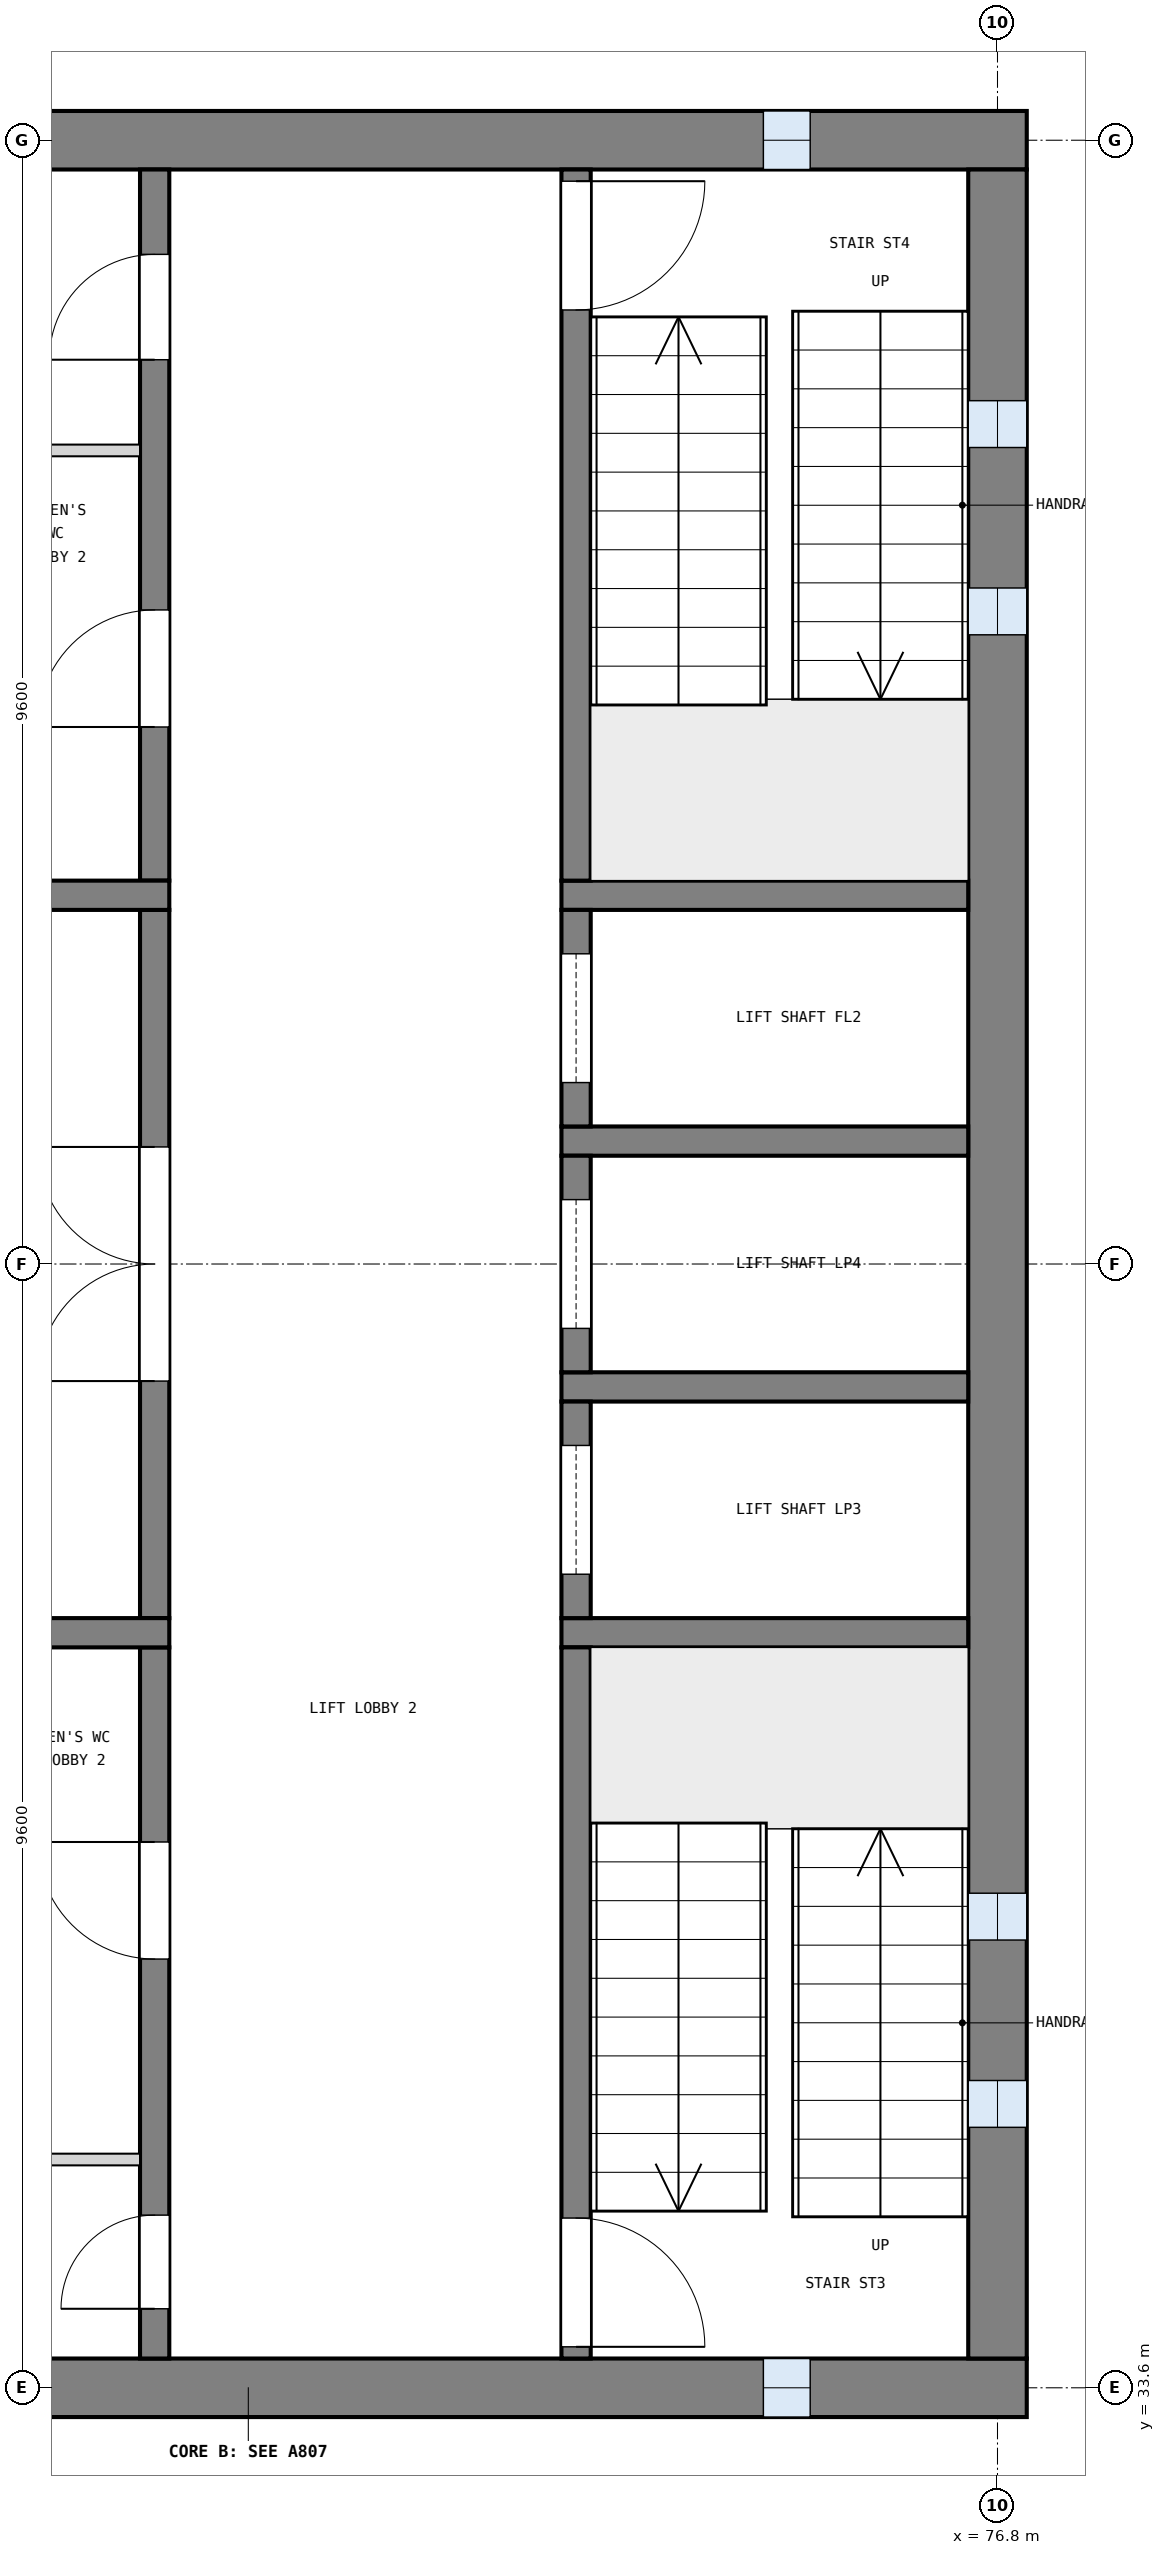
"""IFC4 building model, lengths in metres.
Left out: names, types, materials, properties, quantities, classifications, styles, units other than length and angle.
Written with IfcOpenShell. Run it as: python <this file> out.ifc"""

import sys

from ifc_helpers import new_model, si_unit, direction, frame, frame_2d, origin, place, context, subcontext, project, spatial, rectangle, extrude, element, fill, save


model = new_model("IFC4")
c1 = context("Model", 3, precision=1e-05, world=origin(), true_north=direction((0.0, 1.0)))
c2 = subcontext(c1, "Body", "Model", "MODEL_VIEW")
j1 = project(units=[si_unit("LENGTHUNIT", "METRE"), si_unit("PLANEANGLEUNIT", "RADIAN")], contexts=[c1])
p1 = place(None, origin())
s1 = spatial("IfcSite", under=j1, at=p1, CompositionType="ELEMENT")
p2 = place(p1, origin())
s2 = spatial("IfcBuilding", under=s1, at=p2, CompositionType="ELEMENT")
p3 = place(p2, frame((0.0, 0.0, 21.0)))
s3 = spatial("IfcBuildingStorey", under=s2, at=p3, CompositionType="ELEMENT", Elevation=21.0)
p4 = place(p3, frame((63.75, 52.8, 0.0), z_axis=(0.0, 0.0, 1.0), x_axis=(1.0, 0.0, 0.0)))
e1 = element("IfcWall", 1, at=p4, inside=s3, PredefinedType="SHEAR", context=c2, shape_type="SweptSolid", body=[
    extrude(rectangle(XDim=13.3, YDim=0.5, at=frame_2d((6.65, 0.0))), origin(), (0.0, 0.0, 1.0), 3.9),
])
p5 = place(p4, frame((11.05, 0.0, 1.0)))
e2 = element("IfcOpeningElement", 2, at=p5, cuts=e1, PredefinedType="OPENING", context=c2, shape_type="SweptSolid", body=[
    extrude(rectangle(XDim=0.4, YDim=2.0, at=frame_2d((0.2, 1.0))), frame((0.0, 0.26, 0.0), z_axis=(0.0, -1.0, 0.0), x_axis=(1.0, 0.0, 0.0)), (0.0, 0.0, 1.0), 0.52),
])
p6 = place(p3, frame((63.75, 33.6, 0.0), z_axis=(0.0, 0.0, 1.0), x_axis=(1.0, 0.0, 0.0)))
e3 = element("IfcWall", 3, at=p6, inside=s3, PredefinedType="SHEAR", context=c2, shape_type="SweptSolid", body=[
    extrude(rectangle(XDim=13.3, YDim=0.5, at=frame_2d((6.65, 0.0))), origin(), (0.0, 0.0, 1.0), 3.9),
])
p7 = place(p6, frame((11.05, 0.0, 1.0)))
e4 = element("IfcOpeningElement", 4, at=p7, cuts=e3, PredefinedType="OPENING", context=c2, shape_type="SweptSolid", body=[
    extrude(rectangle(XDim=0.4, YDim=2.0, at=frame_2d((0.2, 1.0))), frame((0.0, 0.26, 0.0), z_axis=(0.0, -1.0, 0.0), x_axis=(1.0, 0.0, 0.0)), (0.0, 0.0, 1.0), 0.52),
])
p8 = place(p3, frame((76.8, 33.85, 0.0), z_axis=(0.0, 0.0, 1.0), x_axis=(0.0, 1.0, 0.0)))
e5 = element("IfcWall", 5, at=p8, inside=s3, PredefinedType="SHEAR", context=c2, shape_type="SweptSolid", body=[
    extrude(rectangle(XDim=18.7, YDim=0.5, at=frame_2d((9.35, 0.0))), origin(), (0.0, 0.0, 1.0), 3.9),
])
p9 = place(p8, frame((1.975, 0.0, 1.0)))
e6 = element("IfcOpeningElement", 6, at=p9, cuts=e5, PredefinedType="OPENING", context=c2, shape_type="SweptSolid", body=[
    extrude(rectangle(XDim=0.4, YDim=2.0, at=frame_2d((0.2, 1.0))), frame((0.0, 0.26, 0.0), z_axis=(0.0, -1.0, 0.0), x_axis=(1.0, 0.0, 0.0)), (0.0, 0.0, 1.0), 0.52),
])
p10 = place(p8, frame((3.575, 0.0, 1.0)))
e7 = element("IfcOpeningElement", 7, at=p10, cuts=e5, PredefinedType="OPENING", context=c2, shape_type="SweptSolid", body=[
    extrude(rectangle(XDim=0.4, YDim=2.0, at=frame_2d((0.2, 1.0))), frame((0.0, 0.26, 0.0), z_axis=(0.0, -1.0, 0.0), x_axis=(1.0, 0.0, 0.0)), (0.0, 0.0, 1.0), 0.52),
])
p11 = place(p8, frame((14.725, 0.0, 1.0)))
e8 = element("IfcOpeningElement", 8, at=p11, cuts=e5, PredefinedType="OPENING", context=c2, shape_type="SweptSolid", body=[
    extrude(rectangle(XDim=0.4, YDim=2.0, at=frame_2d((0.2, 1.0))), frame((0.0, 0.26, 0.0), z_axis=(0.0, -1.0, 0.0), x_axis=(1.0, 0.0, 0.0)), (0.0, 0.0, 1.0), 0.52),
])
p12 = place(p8, frame((16.325, 0.0, 1.0)))
e9 = element("IfcOpeningElement", 9, at=p12, cuts=e5, PredefinedType="OPENING", context=c2, shape_type="SweptSolid", body=[
    extrude(rectangle(XDim=0.4, YDim=2.0, at=frame_2d((0.2, 1.0))), frame((0.0, 0.26, 0.0), z_axis=(0.0, -1.0, 0.0), x_axis=(1.0, 0.0, 0.0)), (0.0, 0.0, 1.0), 0.52),
])
for number, where, z_axis, x_axis in (
    (10, (76.55, 40.05, 0.0), (0.0, 0.0, 1.0), (-1.0, 0.0, 0.0)),
    (11, (76.55, 42.15, 0.0), (0.0, 0.0, 1.0), (-1.0, 0.0, 0.0)),
    (12, (76.55, 44.25, 0.0), (0.0, 0.0, 1.0), (-1.0, 0.0, 0.0)),
    (13, (76.55, 46.35, 0.0), (0.0, 0.0, 1.0), (-1.0, 0.0, 0.0)),
):
    element("IfcWall", number, at=place(p3, frame(where, z_axis=z_axis, x_axis=x_axis)), inside=s3, PredefinedType="SOLIDWALL", context=c2, shape_type="SweptSolid", body=[
        extrude(rectangle(XDim=3.475, YDim=0.25, at=frame_2d((1.738, 0.0))), origin(), (0.0, 0.0, 1.0), 3.6),
    ])
p13 = place(p3, frame((73.2, 33.85, 0.0), z_axis=(0.0, 0.0, 1.0), x_axis=(0.0, 1.0, 0.0)))
e14 = element("IfcWall", 14, at=p13, inside=s3, PredefinedType="SOLIDWALL", context=c2, shape_type="SweptSolid", body=[
    extrude(rectangle(XDim=6.075, YDim=0.25, at=frame_2d((3.038, 0.0))), origin(), (0.0, 0.0, 1.0), 3.6),
])
p14 = place(p13, frame((0.1, 0.0, 0.0)))
e15 = element("IfcOpeningElement", 15, at=p14, cuts=e14, PredefinedType="OPENING", context=c2, shape_type="SweptSolid", body=[
    extrude(rectangle(XDim=1.1, YDim=2.1, at=frame_2d((0.55, 1.05))), frame((0.0, 0.135, 0.0), z_axis=(0.0, -1.0, 0.0), x_axis=(1.0, 0.0, 0.0)), (0.0, 0.0, 1.0), 0.27),
])
p15 = place(p3, frame((73.2, 40.175, 0.0), z_axis=(0.0, 0.0, 1.0), x_axis=(0.0, 1.0, 0.0)))
e16 = element("IfcWall", 16, at=p15, inside=s3, PredefinedType="SOLIDWALL", context=c2, shape_type="SweptSolid", body=[
    extrude(rectangle(XDim=1.85, YDim=0.25, at=frame_2d((0.925, 0.0))), origin(), (0.0, 0.0, 1.0), 3.6),
])
p16 = place(p15, frame((0.375, 0.0, 0.0)))
e17 = element("IfcOpeningElement", 17, at=p16, cuts=e16, PredefinedType="OPENING", context=c2, shape_type="SweptSolid", body=[
    extrude(rectangle(XDim=1.1, YDim=2.1, at=frame_2d((0.55, 1.05))), frame((0.0, 0.135, 0.0), z_axis=(0.0, -1.0, 0.0), x_axis=(1.0, 0.0, 0.0)), (0.0, 0.0, 1.0), 0.27),
])
p17 = place(p3, frame((73.2, 42.275, 0.0), z_axis=(0.0, 0.0, 1.0), x_axis=(0.0, 1.0, 0.0)))
e18 = element("IfcWall", 18, at=p17, inside=s3, PredefinedType="SOLIDWALL", context=c2, shape_type="SweptSolid", body=[
    extrude(rectangle(XDim=1.85, YDim=0.25, at=frame_2d((0.925, 0.0))), origin(), (0.0, 0.0, 1.0), 3.6),
])
p18 = place(p17, frame((0.375, 0.0, 0.0)))
e19 = element("IfcOpeningElement", 19, at=p18, cuts=e18, PredefinedType="OPENING", context=c2, shape_type="SweptSolid", body=[
    extrude(rectangle(XDim=1.1, YDim=2.1, at=frame_2d((0.55, 1.05))), frame((0.0, 0.135, 0.0), z_axis=(0.0, -1.0, 0.0), x_axis=(1.0, 0.0, 0.0)), (0.0, 0.0, 1.0), 0.27),
])
p19 = place(p3, frame((73.2, 44.375, 0.0), z_axis=(0.0, 0.0, 1.0), x_axis=(0.0, 1.0, 0.0)))
e20 = element("IfcWall", 20, at=p19, inside=s3, PredefinedType="SOLIDWALL", context=c2, shape_type="SweptSolid", body=[
    extrude(rectangle(XDim=1.85, YDim=0.25, at=frame_2d((0.925, 0.0))), origin(), (0.0, 0.0, 1.0), 3.6),
])
p20 = place(p19, frame((0.375, 0.0, 0.0)))
e21 = element("IfcOpeningElement", 21, at=p20, cuts=e20, PredefinedType="OPENING", context=c2, shape_type="SweptSolid", body=[
    extrude(rectangle(XDim=1.1, YDim=2.1, at=frame_2d((0.55, 1.05))), frame((0.0, 0.135, 0.0), z_axis=(0.0, -1.0, 0.0), x_axis=(1.0, 0.0, 0.0)), (0.0, 0.0, 1.0), 0.27),
])
p21 = place(p3, frame((73.2, 46.475, 0.0), z_axis=(0.0, 0.0, 1.0), x_axis=(0.0, 1.0, 0.0)))
e22 = element("IfcWall", 22, at=p21, inside=s3, PredefinedType="SOLIDWALL", context=c2, shape_type="SweptSolid", body=[
    extrude(rectangle(XDim=6.075, YDim=0.25, at=frame_2d((3.038, 0.0))), origin(), (0.0, 0.0, 1.0), 3.6),
])
p22 = place(p21, frame((4.875, 0.0, 0.0)))
e23 = element("IfcOpeningElement", 23, at=p22, cuts=e22, PredefinedType="OPENING", context=c2, shape_type="SweptSolid", body=[
    extrude(rectangle(XDim=1.1, YDim=2.1, at=frame_2d((0.55, 1.05))), frame((0.0, 0.135, 0.0), z_axis=(0.0, -1.0, 0.0), x_axis=(1.0, 0.0, 0.0)), (0.0, 0.0, 1.0), 0.27),
])
p23 = place(p3, frame((69.6, 33.85, 0.0), z_axis=(0.0, 0.0, 1.0), x_axis=(0.0, 1.0, 0.0)))
e24 = element("IfcWall", 24, at=p23, inside=s3, PredefinedType="SOLIDWALL", context=c2, shape_type="SweptSolid", body=[
    extrude(rectangle(XDim=6.075, YDim=0.25, at=frame_2d((3.038, 0.0))), origin(), (0.0, 0.0, 1.0), 3.6),
])
p24 = place(p23, frame((0.425, 0.0, 0.0)))
e25 = element("IfcOpeningElement", 25, at=p24, cuts=e24, PredefinedType="OPENING", context=c2, shape_type="SweptSolid", body=[
    extrude(rectangle(XDim=0.8, YDim=2.1, at=frame_2d((0.4, 1.05))), frame((0.0, 0.135, 0.0), z_axis=(0.0, -1.0, 0.0), x_axis=(1.0, 0.0, 0.0)), (0.0, 0.0, 1.0), 0.27),
])
p25 = place(p23, frame((3.413, 0.0, 0.0)))
e26 = element("IfcOpeningElement", 26, at=p25, cuts=e24, PredefinedType="OPENING", context=c2, shape_type="SweptSolid", body=[
    extrude(rectangle(XDim=1.0, YDim=2.1, at=frame_2d((0.5, 1.05))), frame((0.0, 0.135, 0.0), z_axis=(0.0, -1.0, 0.0), x_axis=(1.0, 0.0, 0.0)), (0.0, 0.0, 1.0), 0.27),
])
p26 = place(p3, frame((69.6, 40.175, 0.0), z_axis=(0.0, 0.0, 1.0), x_axis=(0.0, 1.0, 0.0)))
e27 = element("IfcWall", 27, at=p26, inside=s3, PredefinedType="SOLIDWALL", context=c2, shape_type="SweptSolid", body=[
    extrude(rectangle(XDim=6.05, YDim=0.25, at=frame_2d((3.025, 0.0))), origin(), (0.0, 0.0, 1.0), 3.6),
])
p27 = place(p26, frame((2.025, 0.0, 0.0)))
e28 = element("IfcOpeningElement", 28, at=p27, cuts=e27, PredefinedType="OPENING", context=c2, shape_type="SweptSolid", body=[
    extrude(rectangle(XDim=2.0, YDim=2.1, at=frame_2d((1.0, 1.05))), frame((0.0, 0.135, 0.0), z_axis=(0.0, -1.0, 0.0), x_axis=(1.0, 0.0, 0.0)), (0.0, 0.0, 1.0), 0.27),
])
p28 = place(p3, frame((69.6, 46.475, 0.0), z_axis=(0.0, 0.0, 1.0), x_axis=(0.0, 1.0, 0.0)))
e29 = element("IfcWall", 29, at=p28, inside=s3, PredefinedType="SOLIDWALL", context=c2, shape_type="SweptSolid", body=[
    extrude(rectangle(XDim=6.075, YDim=0.25, at=frame_2d((3.038, 0.0))), origin(), (0.0, 0.0, 1.0), 3.6),
])
p29 = place(p28, frame((1.312, 0.0, 0.0)))
e30 = element("IfcOpeningElement", 30, at=p29, cuts=e29, PredefinedType="OPENING", context=c2, shape_type="SweptSolid", body=[
    extrude(rectangle(XDim=1.0, YDim=2.1, at=frame_2d((0.5, 1.05))), frame((0.0, 0.135, 0.0), z_axis=(0.0, -1.0, 0.0), x_axis=(1.0, 0.0, 0.0)), (0.0, 0.0, 1.0), 0.27),
])
p30 = place(p28, frame((4.45, 0.0, 0.0)))
e31 = element("IfcOpeningElement", 31, at=p30, cuts=e29, PredefinedType="OPENING", context=c2, shape_type="SweptSolid", body=[
    extrude(rectangle(XDim=0.9, YDim=2.1, at=frame_2d((0.45, 1.05))), frame((0.0, 0.135, 0.0), z_axis=(0.0, -1.0, 0.0), x_axis=(1.0, 0.0, 0.0)), (0.0, 0.0, 1.0), 0.27),
])
for number, where, z_axis, x_axis in (
    (32, (69.725, 40.05, 0.0), (0.0, 0.0, 1.0), (-1.0, 0.0, 0.0)),
    (33, (69.725, 46.35, 0.0), (0.0, 0.0, 1.0), (-1.0, 0.0, 0.0)),
):
    element("IfcWall", number, at=place(p3, frame(where, z_axis=z_axis, x_axis=x_axis)), inside=s3, PredefinedType="SOLIDWALL", context=c2, shape_type="SweptSolid", body=[
        extrude(rectangle(XDim=5.475, YDim=0.25, at=frame_2d((2.738, 0.0))), origin(), (0.0, 0.0, 1.0), 3.6),
    ])
for number, where, z_axis, x_axis in (
    (34, (69.475, 35.55, 0.0), (0.0, 0.0, 1.0), (-1.0, 0.0, 0.0)),
    (35, (69.475, 50.15, 0.0), (0.0, 0.0, 1.0), (-1.0, 0.0, 0.0)),
):
    element("IfcWall", number, at=place(p3, frame(where, z_axis=z_axis, x_axis=x_axis)), inside=s3, PredefinedType="PARTITIONING", context=c2, shape_type="SweptSolid", body=[
        extrude(rectangle(XDim=5.225, YDim=0.1, at=frame_2d((2.613, 0.0))), origin(), (0.0, 0.0, 1.0), 3.6),
    ])
p31 = place(p9, origin())
e36 = element("IfcWindow", 36, at=p31, inside=s3, PartitioningType="SINGLE_PANEL", PredefinedType="WINDOW", context=c2, shape_type="SweptSolid", body=[
    extrude(rectangle(XDim=0.4, YDim=2.0, at=frame_2d((0.2, 1.0))), frame((0.0, 0.03, 0.0), z_axis=(0.0, -1.0, 0.0), x_axis=(1.0, 0.0, 0.0)), (0.0, 0.0, 1.0), 0.06),
])
fill(e6, e36)
p32 = place(p10, origin())
e37 = element("IfcWindow", 37, at=p32, inside=s3, PartitioningType="SINGLE_PANEL", PredefinedType="WINDOW", context=c2, shape_type="SweptSolid", body=[
    extrude(rectangle(XDim=0.4, YDim=2.0, at=frame_2d((0.2, 1.0))), frame((0.0, 0.03, 0.0), z_axis=(0.0, -1.0, 0.0), x_axis=(1.0, 0.0, 0.0)), (0.0, 0.0, 1.0), 0.06),
])
fill(e7, e37)
p33 = place(p11, origin())
e38 = element("IfcWindow", 38, at=p33, inside=s3, PartitioningType="SINGLE_PANEL", PredefinedType="WINDOW", context=c2, shape_type="SweptSolid", body=[
    extrude(rectangle(XDim=0.4, YDim=2.0, at=frame_2d((0.2, 1.0))), frame((0.0, 0.03, 0.0), z_axis=(0.0, -1.0, 0.0), x_axis=(1.0, 0.0, 0.0)), (0.0, 0.0, 1.0), 0.06),
])
fill(e8, e38)
p34 = place(p12, origin())
e39 = element("IfcWindow", 39, at=p34, inside=s3, PartitioningType="SINGLE_PANEL", PredefinedType="WINDOW", context=c2, shape_type="SweptSolid", body=[
    extrude(rectangle(XDim=0.4, YDim=2.0, at=frame_2d((0.2, 1.0))), frame((0.0, 0.03, 0.0), z_axis=(0.0, -1.0, 0.0), x_axis=(1.0, 0.0, 0.0)), (0.0, 0.0, 1.0), 0.06),
])
fill(e9, e39)
p35 = place(p7, origin())
e40 = element("IfcWindow", 40, at=p35, inside=s3, PartitioningType="SINGLE_PANEL", PredefinedType="WINDOW", context=c2, shape_type="SweptSolid", body=[
    extrude(rectangle(XDim=0.4, YDim=2.0, at=frame_2d((0.2, 1.0))), frame((0.0, 0.03, 0.0), z_axis=(0.0, -1.0, 0.0), x_axis=(1.0, 0.0, 0.0)), (0.0, 0.0, 1.0), 0.06),
])
fill(e4, e40)
p36 = place(p5, origin())
e41 = element("IfcWindow", 41, at=p36, inside=s3, PartitioningType="SINGLE_PANEL", PredefinedType="WINDOW", context=c2, shape_type="SweptSolid", body=[
    extrude(rectangle(XDim=0.4, YDim=2.0, at=frame_2d((0.2, 1.0))), frame((0.0, 0.03, 0.0), z_axis=(0.0, -1.0, 0.0), x_axis=(1.0, 0.0, 0.0)), (0.0, 0.0, 1.0), 0.06),
])
fill(e2, e41)
p37 = place(p14, frame((1.1, 0.0, 0.0), z_axis=(0.0, 0.0, 1.0), x_axis=(-1.0, 0.0, 0.0)))
e42 = element("IfcDoor", 42, at=p37, inside=s3, OperationType="SINGLE_SWING_RIGHT", PredefinedType="DOOR", context=c2, shape_type="SweptSolid", body=[
    extrude(rectangle(XDim=1.1, YDim=2.1, at=frame_2d((0.55, 1.05))), frame((0.0, 0.025, 0.0), z_axis=(0.0, -1.0, 0.0), x_axis=(1.0, 0.0, 0.0)), (0.0, 0.0, 1.0), 0.05),
])
fill(e15, e42)
p38 = place(p22, frame((1.1, 0.0, 0.0), z_axis=(0.0, 0.0, 1.0), x_axis=(-1.0, 0.0, 0.0)))
e43 = element("IfcDoor", 43, at=p38, inside=s3, OperationType="SINGLE_SWING_LEFT", PredefinedType="DOOR", context=c2, shape_type="SweptSolid", body=[
    extrude(rectangle(XDim=1.1, YDim=2.1, at=frame_2d((0.55, 1.05))), frame((0.0, 0.025, 0.0), z_axis=(0.0, -1.0, 0.0), x_axis=(1.0, 0.0, 0.0)), (0.0, 0.0, 1.0), 0.05),
])
fill(e23, e43)
p39 = place(p16, origin())
e44 = element("IfcDoor", 44, at=p39, inside=s3, OperationType="SLIDING_TO_LEFT", PredefinedType="DOOR", context=c2, shape_type="SweptSolid", body=[
    extrude(rectangle(XDim=1.1, YDim=2.1, at=frame_2d((0.55, 1.05))), frame((0.0, 0.025, 0.0), z_axis=(0.0, -1.0, 0.0), x_axis=(1.0, 0.0, 0.0)), (0.0, 0.0, 1.0), 0.05),
])
fill(e17, e44)
p40 = place(p18, origin())
e45 = element("IfcDoor", 45, at=p40, inside=s3, OperationType="SLIDING_TO_LEFT", PredefinedType="DOOR", context=c2, shape_type="SweptSolid", body=[
    extrude(rectangle(XDim=1.1, YDim=2.1, at=frame_2d((0.55, 1.05))), frame((0.0, 0.025, 0.0), z_axis=(0.0, -1.0, 0.0), x_axis=(1.0, 0.0, 0.0)), (0.0, 0.0, 1.0), 0.05),
])
fill(e19, e45)
p41 = place(p20, origin())
e46 = element("IfcDoor", 46, at=p41, inside=s3, OperationType="SLIDING_TO_LEFT", PredefinedType="DOOR", context=c2, shape_type="SweptSolid", body=[
    extrude(rectangle(XDim=1.1, YDim=2.1, at=frame_2d((0.55, 1.05))), frame((0.0, 0.025, 0.0), z_axis=(0.0, -1.0, 0.0), x_axis=(1.0, 0.0, 0.0)), (0.0, 0.0, 1.0), 0.05),
])
fill(e21, e46)
p42 = place(p27, origin())
e47 = element("IfcDoor", 47, at=p42, inside=s3, OperationType="DOUBLE_DOOR_SINGLE_SWING", PredefinedType="DOOR", context=c2, shape_type="SweptSolid", body=[
    extrude(rectangle(XDim=2.0, YDim=2.1, at=frame_2d((1.0, 1.05))), frame((0.0, 0.025, 0.0), z_axis=(0.0, -1.0, 0.0), x_axis=(1.0, 0.0, 0.0)), (0.0, 0.0, 1.0), 0.05),
])
fill(e28, e47)
p43 = place(p24, origin())
e48 = element("IfcDoor", 48, at=p43, inside=s3, OperationType="SINGLE_SWING_LEFT", PredefinedType="DOOR", context=c2, shape_type="SweptSolid", body=[
    extrude(rectangle(XDim=0.8, YDim=2.1, at=frame_2d((0.4, 1.05))), frame((0.0, 0.025, 0.0), z_axis=(0.0, -1.0, 0.0), x_axis=(1.0, 0.0, 0.0)), (0.0, 0.0, 1.0), 0.05),
])
fill(e25, e48)
p44 = place(p25, origin())
e49 = element("IfcDoor", 49, at=p44, inside=s3, OperationType="SINGLE_SWING_RIGHT", PredefinedType="DOOR", context=c2, shape_type="SweptSolid", body=[
    extrude(rectangle(XDim=1.0, YDim=2.1, at=frame_2d((0.5, 1.05))), frame((0.0, 0.025, 0.0), z_axis=(0.0, -1.0, 0.0), x_axis=(1.0, 0.0, 0.0)), (0.0, 0.0, 1.0), 0.05),
])
fill(e26, e49)
p45 = place(p29, origin())
e50 = element("IfcDoor", 50, at=p45, inside=s3, OperationType="SINGLE_SWING_LEFT", PredefinedType="DOOR", context=c2, shape_type="SweptSolid", body=[
    extrude(rectangle(XDim=1.0, YDim=2.1, at=frame_2d((0.5, 1.05))), frame((0.0, 0.025, 0.0), z_axis=(0.0, -1.0, 0.0), x_axis=(1.0, 0.0, 0.0)), (0.0, 0.0, 1.0), 0.05),
])
fill(e30, e50)
p46 = place(p30, origin())
e51 = element("IfcDoor", 51, at=p46, inside=s3, OperationType="SINGLE_SWING_LEFT", PredefinedType="DOOR", context=c2, shape_type="SweptSolid", body=[
    extrude(rectangle(XDim=0.9, YDim=2.1, at=frame_2d((0.45, 1.05))), frame((0.0, 0.025, 0.0), z_axis=(0.0, -1.0, 0.0), x_axis=(1.0, 0.0, 0.0)), (0.0, 0.0, 1.0), 0.05),
])
fill(e31, e51)
save(model, sys.argv[1])
